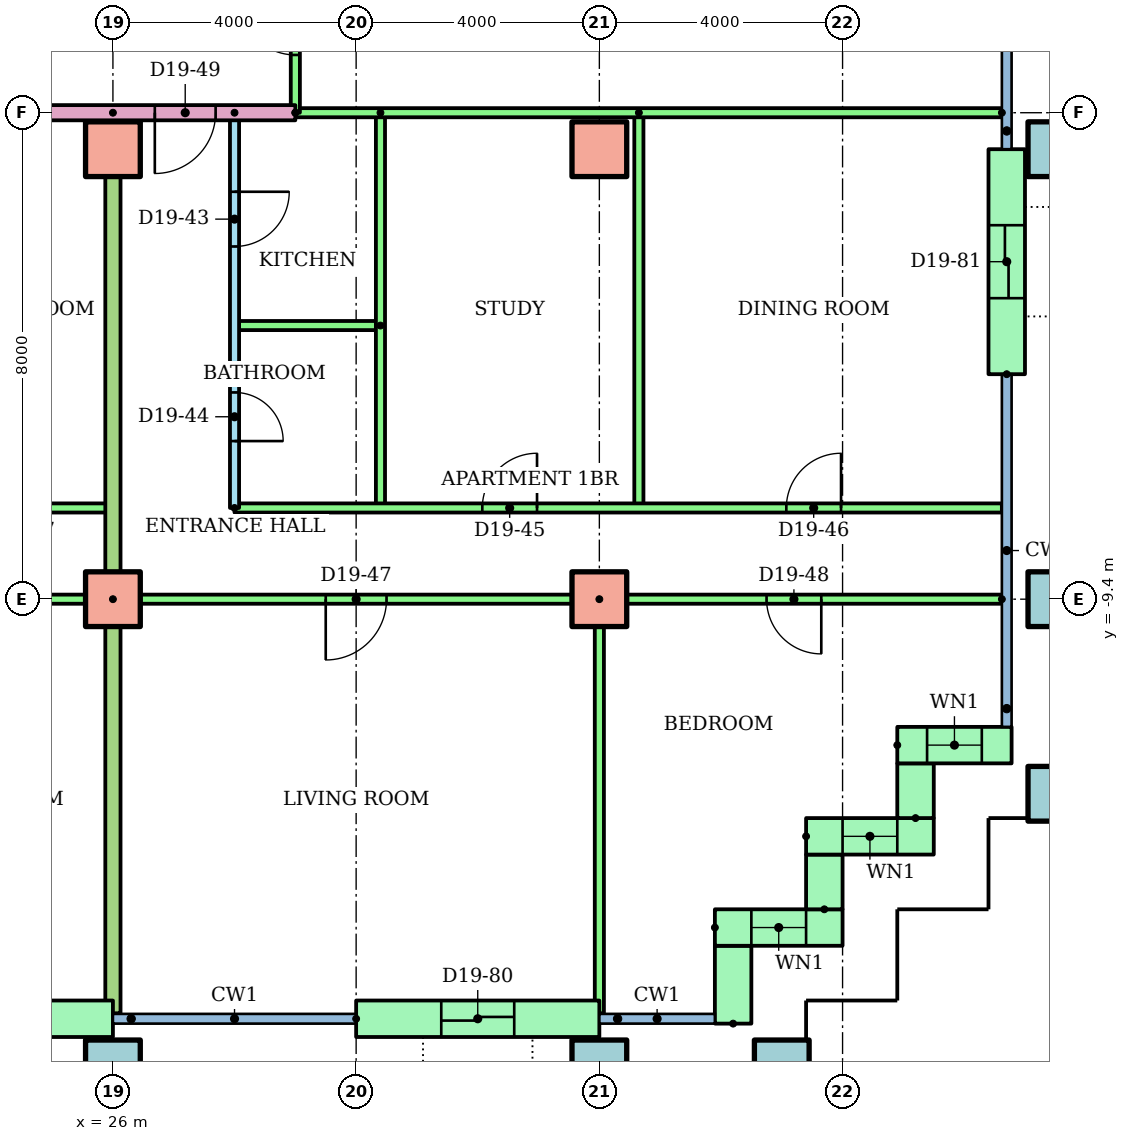
"""IFC4 building model, lengths in metres.
Left out: names, types, materials, properties, quantities, classifications, styles, units other than length and angle.
Written with IfcOpenShell. Run it as: python <this file> out.ifc"""

import sys

from ifc_helpers import new_model, si_unit, direction, frame, frame_2d, origin, origin_2d, place, context, subcontext, project, spatial, rectangle, hollow_rectangle, extrude, element, fill, save


model = new_model("IFC4")
c1 = context("Model", 3, precision=1e-05, world=origin(), true_north=direction((0.0, 1.0)))
c2 = subcontext(c1, "Body", "Model", "MODEL_VIEW")
j1 = project(units=[si_unit("LENGTHUNIT", "METRE"), si_unit("PLANEANGLEUNIT", "RADIAN")], contexts=[c1])
p1 = place(None, origin())
s1 = spatial("IfcSite", under=j1, at=p1, CompositionType="ELEMENT")
p2 = place(p1, origin())
s2 = spatial("IfcBuilding", under=s1, at=p2, CompositionType="ELEMENT")
p3 = place(p2, frame((0.0, 0.0, 77.5)))
s3 = spatial("IfcBuildingStorey", under=s2, at=p3, CompositionType="ELEMENT", Elevation=77.5)
for number, where in (
    (1, (26.0, -17.1, 0.0)),
    (2, (34.0, -17.1, 0.0)),
    (3, (37.0, -17.1, 0.0)),
    (4, (41.5, -12.6, 0.0)),
):
    element("IfcColumn", number, at=place(p3, frame(where)), inside=s3, PredefinedType="COLUMN", context=c2, shape_type="SweptSolid", body=[
        extrude(hollow_rectangle(XDim=0.9, YDim=0.9, WallThickness=0.045, at=origin_2d()), origin(), (0.0, 0.0, 1.0), 3.2),
    ])
for number, where in (
    (5, (26.0, -9.4, 0.0)),
    (6, (34.0, -9.4, 0.0)),
):
    element("IfcColumn", number, at=place(p3, frame(where)), inside=s3, PredefinedType="COLUMN", context=c2, shape_type="SweptSolid", body=[
        extrude(rectangle(XDim=0.9, YDim=0.9, at=origin_2d()), origin(), (0.0, 0.0, 1.0), 3.2),
    ])
p4 = place(p3, frame((41.5, -9.4, 0.0)))
e7 = element("IfcColumn", 7, at=p4, inside=s3, PredefinedType="COLUMN", context=c2, shape_type="SweptSolid", body=[
    extrude(hollow_rectangle(XDim=0.9, YDim=0.9, WallThickness=0.045, at=origin_2d()), origin(), (0.0, 0.0, 1.0), 3.2),
])
for number, where in (
    (8, (26.0, -2.0, 0.0)),
    (9, (34.0, -2.0, 0.0)),
):
    element("IfcColumn", number, at=place(p3, frame(where)), inside=s3, PredefinedType="COLUMN", context=c2, shape_type="SweptSolid", body=[
        extrude(rectangle(XDim=0.9, YDim=0.9, at=origin_2d()), origin(), (0.0, 0.0, 1.0), 3.2),
    ])
p5 = place(p3, frame((41.5, -2.0, 0.0)))
e10 = element("IfcColumn", 10, at=p5, inside=s3, PredefinedType="COLUMN", context=c2, shape_type="SweptSolid", body=[
    extrude(hollow_rectangle(XDim=0.9, YDim=0.9, WallThickness=0.045, at=origin_2d()), origin(), (0.0, 0.0, 1.0), 3.2),
])
p6 = place(p3, frame((22.0, -16.3, 0.0)))
e11 = element("IfcWall", 11, at=p6, inside=s3, PredefinedType="STANDARD", context=c2, shape_type="SweptSolid", body=[
    extrude(rectangle(XDim=4.0, YDim=0.6, at=frame_2d((2.0, 0.0))), origin(), (0.0, 0.0, 1.0), 2.92),
])
p7 = place(p6, frame((1.4, 0.0, 0.0)))
e12 = element("IfcOpeningElement", 12, at=p7, cuts=e11, PredefinedType="OPENING", context=c2, shape_type="SweptSolid", body=[
    extrude(rectangle(XDim=1.2, YDim=2.1, at=frame_2d((0.6, 1.05))), frame((0.0, 0.31, 0.0), z_axis=(0.0, -1.0, 0.0), x_axis=(1.0, 0.0, 0.0)), (0.0, 0.0, 1.0), 0.62),
])
p8 = place(p3, frame((30.0, -16.3, 0.0)))
e13 = element("IfcWall", 13, at=p8, inside=s3, PredefinedType="STANDARD", context=c2, shape_type="SweptSolid", body=[
    extrude(rectangle(XDim=4.0, YDim=0.6, at=frame_2d((2.0, 0.0))), origin(), (0.0, 0.0, 1.0), 2.92),
])
p9 = place(p8, frame((1.4, 0.0, 0.0)))
e14 = element("IfcOpeningElement", 14, at=p9, cuts=e13, PredefinedType="OPENING", context=c2, shape_type="SweptSolid", body=[
    extrude(rectangle(XDim=1.2, YDim=2.1, at=frame_2d((0.6, 1.05))), frame((0.0, 0.31, 0.0), z_axis=(0.0, -1.0, 0.0), x_axis=(1.0, 0.0, 0.0)), (0.0, 0.0, 1.0), 0.62),
])
p10 = place(p3, frame((36.2, -16.38, 0.0), z_axis=(0.0, 0.0, 1.0), x_axis=(0.0, 1.0, 0.0)))
e15 = element("IfcWall", 15, at=p10, inside=s3, PredefinedType="STANDARD", context=c2, shape_type="SweptSolid", body=[
    extrude(rectangle(XDim=1.28, YDim=0.6, at=frame_2d((0.64, 0.0))), origin(), (0.0, 0.0, 1.0), 2.92),
])
p11 = place(p3, frame((35.9, -14.8, 0.0)))
e16 = element("IfcWall", 16, at=p11, inside=s3, PredefinedType="STANDARD", context=c2, shape_type="SweptSolid", body=[
    extrude(rectangle(XDim=2.1, YDim=0.6, at=frame_2d((1.05, 0.0))), origin(), (0.0, 0.0, 1.0), 2.92),
])
p12 = place(p11, frame((0.6, 0.0, 0.9)))
e17 = element("IfcOpeningElement", 17, at=p12, cuts=e16, PredefinedType="OPENING", context=c2, shape_type="SweptSolid", body=[
    extrude(rectangle(XDim=0.9, YDim=1.5, at=frame_2d((0.45, 0.75))), frame((0.0, 0.31, 0.0), z_axis=(0.0, -1.0, 0.0), x_axis=(1.0, 0.0, 0.0)), (0.0, 0.0, 1.0), 0.62),
])
p13 = place(p3, frame((37.7, -14.5, 0.0), z_axis=(0.0, 0.0, 1.0), x_axis=(0.0, 1.0, 0.0)))
e18 = element("IfcWall", 18, at=p13, inside=s3, PredefinedType="STANDARD", context=c2, shape_type="SweptSolid", body=[
    extrude(rectangle(XDim=0.9, YDim=0.6, at=frame_2d((0.45, 0.0))), origin(), (0.0, 0.0, 1.0), 2.92),
])
p14 = place(p3, frame((37.4, -13.3, 0.0)))
e19 = element("IfcWall", 19, at=p14, inside=s3, PredefinedType="STANDARD", context=c2, shape_type="SweptSolid", body=[
    extrude(rectangle(XDim=2.1, YDim=0.6, at=frame_2d((1.05, 0.0))), origin(), (0.0, 0.0, 1.0), 2.92),
])
p15 = place(p14, frame((0.6, 0.0, 0.9)))
e20 = element("IfcOpeningElement", 20, at=p15, cuts=e19, PredefinedType="OPENING", context=c2, shape_type="SweptSolid", body=[
    extrude(rectangle(XDim=0.9, YDim=1.5, at=frame_2d((0.45, 0.75))), frame((0.0, 0.31, 0.0), z_axis=(0.0, -1.0, 0.0), x_axis=(1.0, 0.0, 0.0)), (0.0, 0.0, 1.0), 0.62),
])
p16 = place(p3, frame((39.2, -13.0, 0.0), z_axis=(0.0, 0.0, 1.0), x_axis=(0.0, 1.0, 0.0)))
e21 = element("IfcWall", 21, at=p16, inside=s3, PredefinedType="STANDARD", context=c2, shape_type="SweptSolid", body=[
    extrude(rectangle(XDim=0.9, YDim=0.6, at=frame_2d((0.45, 0.0))), origin(), (0.0, 0.0, 1.0), 2.92),
])
p17 = place(p3, frame((38.9, -11.8, 0.0)))
e22 = element("IfcWall", 22, at=p17, inside=s3, PredefinedType="STANDARD", context=c2, shape_type="SweptSolid", body=[
    extrude(rectangle(XDim=1.88, YDim=0.6, at=frame_2d((0.94, 0.0))), origin(), (0.0, 0.0, 1.0), 2.92),
])
p18 = place(p17, frame((0.49, 0.0, 0.9)))
e23 = element("IfcOpeningElement", 23, at=p18, cuts=e22, PredefinedType="OPENING", context=c2, shape_type="SweptSolid", body=[
    extrude(rectangle(XDim=0.9, YDim=1.5, at=frame_2d((0.45, 0.75))), frame((0.0, 0.31, 0.0), z_axis=(0.0, -1.0, 0.0), x_axis=(1.0, 0.0, 0.0)), (0.0, 0.0, 1.0), 0.62),
])
p19 = place(p3, frame((40.7, -5.7, 0.0), z_axis=(0.0, 0.0, 1.0), x_axis=(0.0, 1.0, 0.0)))
e24 = element("IfcWall", 24, at=p19, inside=s3, PredefinedType="STANDARD", context=c2, shape_type="SweptSolid", body=[
    extrude(rectangle(XDim=3.7, YDim=0.6, at=frame_2d((1.85, 0.0))), origin(), (0.0, 0.0, 1.0), 2.92),
])
p20 = place(p19, frame((1.25, 0.0, 0.0)))
e25 = element("IfcOpeningElement", 25, at=p20, cuts=e24, PredefinedType="OPENING", context=c2, shape_type="SweptSolid", body=[
    extrude(rectangle(XDim=1.2, YDim=2.1, at=frame_2d((0.6, 1.05))), frame((0.0, 0.31, 0.0), z_axis=(0.0, -1.0, 0.0), x_axis=(1.0, 0.0, 0.0)), (0.0, 0.0, 1.0), 0.62),
])
p21 = place(p3, frame((12.0, -7.9, 0.0)))
e26 = element("IfcWall", 26, at=p21, inside=s3, PredefinedType="PARTITIONING", context=c2, shape_type="SweptSolid", body=[
    extrude(rectangle(XDim=14.0, YDim=0.15, at=frame_2d((7.0, 0.0))), origin(), (0.0, 0.0, 1.0), 2.4),
])
p22 = place(p21, frame((4.325, 0.0, 0.0)))
e27 = element("IfcOpeningElement", 27, at=p22, cuts=e26, PredefinedType="OPENING", context=c2, shape_type="SweptSolid", body=[
    extrude(rectangle(XDim=0.9, YDim=2.1, at=frame_2d((0.45, 1.05))), frame((0.0, 0.085, 0.0), z_axis=(0.0, -1.0, 0.0), x_axis=(1.0, 0.0, 0.0)), (0.0, 0.0, 1.0), 0.17),
])
p23 = place(p21, frame((8.575, 0.0, 0.0)))
e28 = element("IfcOpeningElement", 28, at=p23, cuts=e26, PredefinedType="OPENING", context=c2, shape_type="SweptSolid", body=[
    extrude(rectangle(XDim=0.9, YDim=2.1, at=frame_2d((0.45, 1.05))), frame((0.0, 0.085, 0.0), z_axis=(0.0, -1.0, 0.0), x_axis=(1.0, 0.0, 0.0)), (0.0, 0.0, 1.0), 0.17),
])
p24 = place(p21, frame((12.0, 0.0, 0.0)))
e29 = element("IfcOpeningElement", 29, at=p24, cuts=e26, PredefinedType="OPENING", context=c2, shape_type="SweptSolid", body=[
    extrude(rectangle(XDim=0.9, YDim=2.1, at=frame_2d((0.45, 1.05))), frame((0.0, 0.085, 0.0), z_axis=(0.0, -1.0, 0.0), x_axis=(1.0, 0.0, 0.0)), (0.0, 0.0, 1.0), 0.17),
])
p25 = place(p3, frame((26.0, -9.4, 0.0), z_axis=(0.0, 0.0, 1.0), x_axis=(-1.0, 0.0, 0.0)))
e30 = element("IfcWall", 30, at=p25, inside=s3, PredefinedType="PARTITIONING", context=c2, shape_type="SweptSolid", body=[
    extrude(rectangle(XDim=16.0, YDim=0.15, at=frame_2d((8.0, 0.0))), origin(), (0.0, 0.0, 1.0), 2.4),
])
p26 = place(p25, frame((13.55, 0.0, 0.0)))
e31 = element("IfcOpeningElement", 31, at=p26, cuts=e30, PredefinedType="OPENING", context=c2, shape_type="SweptSolid", body=[
    extrude(rectangle(XDim=0.9, YDim=2.1, at=frame_2d((0.45, 1.05))), frame((0.0, 0.085, 0.0), z_axis=(0.0, -1.0, 0.0), x_axis=(1.0, 0.0, 0.0)), (0.0, 0.0, 1.0), 0.17),
])
p27 = place(p25, frame((9.55, 0.0, 0.0)))
e32 = element("IfcOpeningElement", 32, at=p27, cuts=e30, PredefinedType="OPENING", context=c2, shape_type="SweptSolid", body=[
    extrude(rectangle(XDim=0.9, YDim=2.1, at=frame_2d((0.45, 1.05))), frame((0.0, 0.085, 0.0), z_axis=(0.0, -1.0, 0.0), x_axis=(1.0, 0.0, 0.0)), (0.0, 0.0, 1.0), 0.17),
])
p28 = place(p25, frame((5.55, 0.0, 0.0)))
e33 = element("IfcOpeningElement", 33, at=p28, cuts=e30, PredefinedType="OPENING", context=c2, shape_type="SweptSolid", body=[
    extrude(rectangle(XDim=0.9, YDim=2.1, at=frame_2d((0.45, 1.05))), frame((0.0, 0.085, 0.0), z_axis=(0.0, -1.0, 0.0), x_axis=(1.0, 0.0, 0.0)), (0.0, 0.0, 1.0), 0.17),
])
p29 = place(p25, frame((1.5, 0.0, 0.0)))
e34 = element("IfcOpeningElement", 34, at=p29, cuts=e30, PredefinedType="OPENING", context=c2, shape_type="SweptSolid", body=[
    extrude(rectangle(XDim=1.0, YDim=2.1, at=frame_2d((0.5, 1.05))), frame((0.0, 0.085, 0.0), z_axis=(0.0, -1.0, 0.0), x_axis=(1.0, 0.0, 0.0)), (0.0, 0.0, 1.0), 0.17),
])
p30 = place(p3, frame((28.0, -1.4, 0.0), z_axis=(0.0, 0.0, 1.0), x_axis=(0.0, -1.0, 0.0)))
e35 = element("IfcWall", 35, at=p30, inside=s3, PredefinedType="PARTITIONING", context=c2, shape_type="SweptSolid", body=[
    extrude(rectangle(XDim=6.5, YDim=0.15, at=frame_2d((3.25, 0.0))), origin(), (0.0, 0.0, 1.0), 2.4),
])
p31 = place(p30, frame((1.3, 0.0, 0.0)))
e36 = element("IfcOpeningElement", 36, at=p31, cuts=e35, PredefinedType="OPENING", context=c2, shape_type="SweptSolid", body=[
    extrude(rectangle(XDim=0.9, YDim=2.1, at=frame_2d((0.45, 1.05))), frame((0.0, 0.085, 0.0), z_axis=(0.0, -1.0, 0.0), x_axis=(1.0, 0.0, 0.0)), (0.0, 0.0, 1.0), 0.17),
])
p32 = place(p30, frame((4.6, 0.0, 0.0)))
e37 = element("IfcOpeningElement", 37, at=p32, cuts=e35, PredefinedType="OPENING", context=c2, shape_type="SweptSolid", body=[
    extrude(rectangle(XDim=0.8, YDim=2.1, at=frame_2d((0.4, 1.05))), frame((0.0, 0.085, 0.0), z_axis=(0.0, -1.0, 0.0), x_axis=(1.0, 0.0, 0.0)), (0.0, 0.0, 1.0), 0.17),
])
p33 = place(p3, frame((30.4, -4.9, 0.0), z_axis=(0.0, 0.0, 1.0), x_axis=(-1.0, 0.0, 0.0)))
e38 = element("IfcWall", 38, at=p33, inside=s3, PredefinedType="PARTITIONING", context=c2, shape_type="SweptSolid", body=[
    extrude(rectangle(XDim=2.4, YDim=0.15, at=frame_2d((1.2, 0.0))), origin(), (0.0, 0.0, 1.0), 2.4),
])
for number, where, z_axis, x_axis in (
    (39, (30.4, -1.4, 0.0), (0.0, 0.0, 1.0), (0.0, -1.0, 0.0)),
    (40, (34.65, -1.4, 0.0), (0.0, 0.0, 1.0), (0.0, -1.0, 0.0)),
):
    element("IfcWall", number, at=place(p3, frame(where, z_axis=z_axis, x_axis=x_axis)), inside=s3, PredefinedType="PARTITIONING", context=c2, shape_type="SweptSolid", body=[
        extrude(rectangle(XDim=6.5, YDim=0.15, at=frame_2d((3.25, 0.0))), origin(), (0.0, 0.0, 1.0), 2.4),
    ])
p34 = place(p3, frame((28.0, -7.9, 0.0)))
e41 = element("IfcWall", 41, at=p34, inside=s3, PredefinedType="PARTITIONING", context=c2, shape_type="SweptSolid", body=[
    extrude(rectangle(XDim=12.62, YDim=0.15, at=frame_2d((6.31, 0.0))), origin(), (0.0, 0.0, 1.0), 2.4),
])
p35 = place(p34, frame((4.075, 0.0, 0.0)))
e42 = element("IfcOpeningElement", 42, at=p35, cuts=e41, PredefinedType="OPENING", context=c2, shape_type="SweptSolid", body=[
    extrude(rectangle(XDim=0.9, YDim=2.1, at=frame_2d((0.45, 1.05))), frame((0.0, 0.085, 0.0), z_axis=(0.0, -1.0, 0.0), x_axis=(1.0, 0.0, 0.0)), (0.0, 0.0, 1.0), 0.17),
])
p36 = place(p34, frame((9.075, 0.0, 0.0)))
e43 = element("IfcOpeningElement", 43, at=p36, cuts=e41, PredefinedType="OPENING", context=c2, shape_type="SweptSolid", body=[
    extrude(rectangle(XDim=0.9, YDim=2.1, at=frame_2d((0.45, 1.05))), frame((0.0, 0.085, 0.0), z_axis=(0.0, -1.0, 0.0), x_axis=(1.0, 0.0, 0.0)), (0.0, 0.0, 1.0), 0.17),
])
p37 = place(p3, frame((40.62, -9.4, 0.0), z_axis=(0.0, 0.0, 1.0), x_axis=(-1.0, 0.0, 0.0)))
e44 = element("IfcWall", 44, at=p37, inside=s3, PredefinedType="PARTITIONING", context=c2, shape_type="SweptSolid", body=[
    extrude(rectangle(XDim=14.62, YDim=0.15, at=frame_2d((7.31, 0.0))), origin(), (0.0, 0.0, 1.0), 2.4),
])
p38 = place(p37, frame((10.12, 0.0, 0.0)))
e45 = element("IfcOpeningElement", 45, at=p38, cuts=e44, PredefinedType="OPENING", context=c2, shape_type="SweptSolid", body=[
    extrude(rectangle(XDim=1.0, YDim=2.1, at=frame_2d((0.5, 1.05))), frame((0.0, 0.085, 0.0), z_axis=(0.0, -1.0, 0.0), x_axis=(1.0, 0.0, 0.0)), (0.0, 0.0, 1.0), 0.17),
])
p39 = place(p37, frame((2.97, 0.0, 0.0)))
e46 = element("IfcOpeningElement", 46, at=p39, cuts=e44, PredefinedType="OPENING", context=c2, shape_type="SweptSolid", body=[
    extrude(rectangle(XDim=0.9, YDim=2.1, at=frame_2d((0.45, 1.05))), frame((0.0, 0.085, 0.0), z_axis=(0.0, -1.0, 0.0), x_axis=(1.0, 0.0, 0.0)), (0.0, 0.0, 1.0), 0.17),
])
p40 = place(p3, frame((34.0, -9.4, 0.0), z_axis=(0.0, 0.0, 1.0), x_axis=(0.0, -1.0, 0.0)))
e47 = element("IfcWall", 47, at=p40, inside=s3, PredefinedType="PARTITIONING", context=c2, shape_type="SweptSolid", body=[
    extrude(rectangle(XDim=6.81, YDim=0.15, at=frame_2d((3.405, 0.0))), origin(), (0.0, 0.0, 1.0), 2.4),
])
p41 = place(p3, frame((26.0, -1.4, 0.0), z_axis=(0.0, 0.0, 1.0), x_axis=(0.0, -1.0, 0.0)))
e48 = element("IfcWall", 48, at=p41, inside=s3, PredefinedType="PARTITIONING", context=c2, shape_type="SweptSolid", body=[
    extrude(rectangle(XDim=14.81, YDim=0.25, at=frame_2d((7.405, 0.0))), origin(), (0.0, 0.0, 1.0), 2.4),
])
p42 = place(p3, frame((29.0, -1.4, 0.0), z_axis=(0.0, 0.0, 1.0), x_axis=(-1.0, 0.0, 0.0)))
e49 = element("IfcWall", 49, at=p42, inside=s3, PredefinedType="PARTITIONING", context=c2, shape_type="SweptSolid", body=[
    extrude(rectangle(XDim=15.0, YDim=0.25, at=frame_2d((7.5, 0.0))), origin(), (0.0, 0.0, 1.0), 2.4),
])
p43 = place(p42, frame((1.311, 0.0, 0.0)))
e50 = element("IfcOpeningElement", 50, at=p43, cuts=e49, PredefinedType="OPENING", context=c2, shape_type="SweptSolid", body=[
    extrude(rectangle(XDim=1.0, YDim=2.1, at=frame_2d((0.5, 1.05))), frame((0.0, 0.135, 0.0), z_axis=(0.0, -1.0, 0.0), x_axis=(1.0, 0.0, 0.0)), (0.0, 0.0, 1.0), 0.27),
])
p44 = place(p3, frame((40.62, -1.4, 0.0), z_axis=(0.0, 0.0, 1.0), x_axis=(-1.0, 0.0, 0.0)))
e51 = element("IfcWall", 51, at=p44, inside=s3, PredefinedType="PARTITIONING", context=c2, shape_type="SweptSolid", body=[
    extrude(rectangle(XDim=11.62, YDim=0.15, at=frame_2d((5.81, 0.0))), origin(), (0.0, 0.0, 1.0), 2.4),
])
p45 = place(p3, frame((29.0, -1.4, 0.0), z_axis=(0.0, 0.0, 1.0), x_axis=(0.0, 1.0, 0.0)))
e52 = element("IfcWall", 52, at=p45, inside=s3, PredefinedType="PARTITIONING", context=c2, shape_type="SweptSolid", body=[
    extrude(rectangle(XDim=2.8, YDim=0.15, at=frame_2d((1.4, 0.0))), origin(), (0.0, 0.0, 1.0), 2.4),
])
p46 = place(p45, frame((0.95, 0.0, 0.0)))
e53 = element("IfcOpeningElement", 53, at=p46, cuts=e52, PredefinedType="OPENING", context=c2, shape_type="SweptSolid", body=[
    extrude(rectangle(XDim=0.9, YDim=2.1, at=frame_2d((0.45, 1.05))), frame((0.0, 0.085, 0.0), z_axis=(0.0, -1.0, 0.0), x_axis=(1.0, 0.0, 0.0)), (0.0, 0.0, 1.0), 0.17),
])
p47 = place(p12, origin())
e54 = element("IfcWindow", 54, at=p47, inside=s3, PartitioningType="SINGLE_PANEL", PredefinedType="WINDOW", context=c2, shape_type="SweptSolid", body=[
    extrude(rectangle(XDim=0.9, YDim=1.5, at=frame_2d((0.45, 0.75))), frame((0.0, 0.03, 0.0), z_axis=(0.0, -1.0, 0.0), x_axis=(1.0, 0.0, 0.0)), (0.0, 0.0, 1.0), 0.06),
])
fill(e17, e54)
p48 = place(p15, origin())
e55 = element("IfcWindow", 55, at=p48, inside=s3, PartitioningType="SINGLE_PANEL", PredefinedType="WINDOW", context=c2, shape_type="SweptSolid", body=[
    extrude(rectangle(XDim=0.9, YDim=1.5, at=frame_2d((0.45, 0.75))), frame((0.0, 0.03, 0.0), z_axis=(0.0, -1.0, 0.0), x_axis=(1.0, 0.0, 0.0)), (0.0, 0.0, 1.0), 0.06),
])
fill(e20, e55)
p49 = place(p18, origin())
e56 = element("IfcWindow", 56, at=p49, inside=s3, PartitioningType="SINGLE_PANEL", PredefinedType="WINDOW", context=c2, shape_type="SweptSolid", body=[
    extrude(rectangle(XDim=0.9, YDim=1.5, at=frame_2d((0.45, 0.75))), frame((0.0, 0.03, 0.0), z_axis=(0.0, -1.0, 0.0), x_axis=(1.0, 0.0, 0.0)), (0.0, 0.0, 1.0), 0.06),
])
fill(e23, e56)
p50 = place(p31, origin())
e57 = element("IfcDoor", 57, at=p50, inside=s3, OperationType="SINGLE_SWING_LEFT", PredefinedType="DOOR", context=c2, shape_type="SweptSolid", body=[
    extrude(rectangle(XDim=0.9, YDim=2.1, at=frame_2d((0.45, 1.05))), frame((0.0, 0.025, 0.0), z_axis=(0.0, -1.0, 0.0), x_axis=(1.0, 0.0, 0.0)), (0.0, 0.0, 1.0), 0.05),
])
fill(e36, e57)
p51 = place(p32, origin())
e58 = element("IfcDoor", 58, at=p51, inside=s3, OperationType="SINGLE_SWING_RIGHT", PredefinedType="DOOR", context=c2, shape_type="SweptSolid", body=[
    extrude(rectangle(XDim=0.8, YDim=2.1, at=frame_2d((0.4, 1.05))), frame((0.0, 0.025, 0.0), z_axis=(0.0, -1.0, 0.0), x_axis=(1.0, 0.0, 0.0)), (0.0, 0.0, 1.0), 0.05),
])
fill(e37, e58)
p52 = place(p35, origin())
e59 = element("IfcDoor", 59, at=p52, inside=s3, OperationType="SINGLE_SWING_RIGHT", PredefinedType="DOOR", context=c2, shape_type="SweptSolid", body=[
    extrude(rectangle(XDim=0.9, YDim=2.1, at=frame_2d((0.45, 1.05))), frame((0.0, 0.025, 0.0), z_axis=(0.0, -1.0, 0.0), x_axis=(1.0, 0.0, 0.0)), (0.0, 0.0, 1.0), 0.05),
])
fill(e42, e59)
p53 = place(p36, origin())
e60 = element("IfcDoor", 60, at=p53, inside=s3, OperationType="SINGLE_SWING_RIGHT", PredefinedType="DOOR", context=c2, shape_type="SweptSolid", body=[
    extrude(rectangle(XDim=0.9, YDim=2.1, at=frame_2d((0.45, 1.05))), frame((0.0, 0.025, 0.0), z_axis=(0.0, -1.0, 0.0), x_axis=(1.0, 0.0, 0.0)), (0.0, 0.0, 1.0), 0.05),
])
fill(e43, e60)
p54 = place(p38, origin())
e61 = element("IfcDoor", 61, at=p54, inside=s3, OperationType="SINGLE_SWING_RIGHT", PredefinedType="DOOR", context=c2, shape_type="SweptSolid", body=[
    extrude(rectangle(XDim=1.0, YDim=2.1, at=frame_2d((0.5, 1.05))), frame((0.0, 0.025, 0.0), z_axis=(0.0, -1.0, 0.0), x_axis=(1.0, 0.0, 0.0)), (0.0, 0.0, 1.0), 0.05),
])
fill(e45, e61)
p55 = place(p39, origin())
e62 = element("IfcDoor", 62, at=p55, inside=s3, OperationType="SINGLE_SWING_LEFT", PredefinedType="DOOR", context=c2, shape_type="SweptSolid", body=[
    extrude(rectangle(XDim=0.9, YDim=2.1, at=frame_2d((0.45, 1.05))), frame((0.0, 0.025, 0.0), z_axis=(0.0, -1.0, 0.0), x_axis=(1.0, 0.0, 0.0)), (0.0, 0.0, 1.0), 0.05),
])
fill(e46, e62)
p56 = place(p43, origin())
e63 = element("IfcDoor", 63, at=p56, inside=s3, OperationType="SINGLE_SWING_RIGHT", PredefinedType="DOOR", context=c2, shape_type="SweptSolid", body=[
    extrude(rectangle(XDim=1.0, YDim=2.1, at=frame_2d((0.5, 1.05))), frame((0.0, 0.025, 0.0), z_axis=(0.0, -1.0, 0.0), x_axis=(1.0, 0.0, 0.0)), (0.0, 0.0, 1.0), 0.05),
])
fill(e50, e63)
p57 = place(p46, origin())
e64 = element("IfcDoor", 64, at=p57, inside=s3, OperationType="SINGLE_SWING_RIGHT", PredefinedType="DOOR", context=c2, shape_type="SweptSolid", body=[
    extrude(rectangle(XDim=0.9, YDim=2.1, at=frame_2d((0.45, 1.05))), frame((0.0, 0.025, 0.0), z_axis=(0.0, -1.0, 0.0), x_axis=(1.0, 0.0, 0.0)), (0.0, 0.0, 1.0), 0.05),
])
fill(e53, e64)
p58 = place(p9, origin())
e65 = element("IfcDoor", 65, at=p58, inside=s3, OperationType="SLIDING_TO_LEFT", PredefinedType="DOOR", context=c2, shape_type="SweptSolid", body=[
    extrude(rectangle(XDim=1.2, YDim=2.1, at=frame_2d((0.6, 1.05))), frame((0.0, 0.025, 0.0), z_axis=(0.0, -1.0, 0.0), x_axis=(1.0, 0.0, 0.0)), (0.0, 0.0, 1.0), 0.05),
])
fill(e14, e65)
p59 = place(p20, origin())
e66 = element("IfcDoor", 66, at=p59, inside=s3, OperationType="SLIDING_TO_LEFT", PredefinedType="DOOR", context=c2, shape_type="SweptSolid", body=[
    extrude(rectangle(XDim=1.2, YDim=2.1, at=frame_2d((0.6, 1.05))), frame((0.0, 0.025, 0.0), z_axis=(0.0, -1.0, 0.0), x_axis=(1.0, 0.0, 0.0)), (0.0, 0.0, 1.0), 0.05),
])
fill(e25, e66)
save(model, sys.argv[1])
